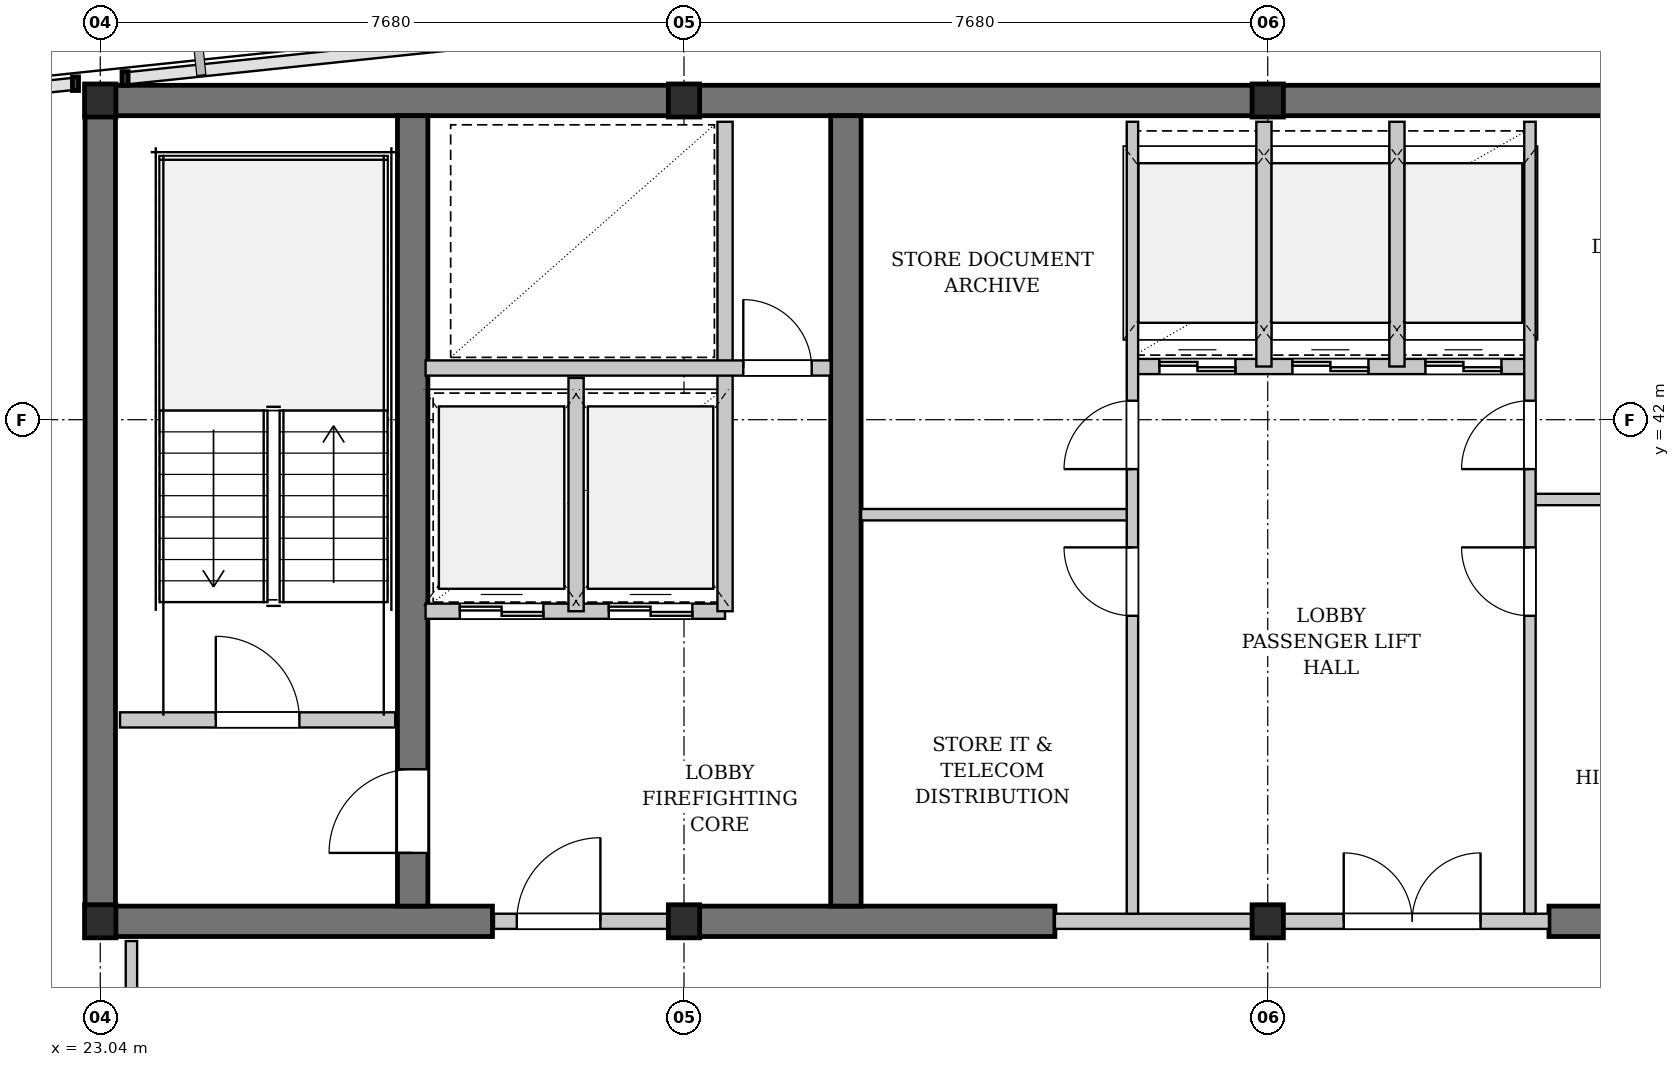
"""IFC4 building model, lengths in metres.
Left out: names, types, materials, properties, quantities, classifications, styles, units other than length and angle.
Written with IfcOpenShell. Run it as: python <this file> out.ifc"""

import sys

from ifc_helpers import new_model, si_unit, direction, frame, frame_2d, origin, origin_2d, place, context, subcontext, project, spatial, rectangle, i_section, extrude, element, fill, save


model = new_model("IFC4")
c1 = context("Model", 3, precision=1e-05, world=origin(), true_north=direction((0.0, 1.0)))
c2 = subcontext(c1, "Body", "Model", "MODEL_VIEW")
j1 = project(units=[si_unit("LENGTHUNIT", "METRE"), si_unit("PLANEANGLEUNIT", "RADIAN")], contexts=[c1])
p1 = place(None, origin())
s1 = spatial("IfcSite", under=j1, at=p1, CompositionType="ELEMENT")
p2 = place(p1, origin())
s2 = spatial("IfcBuilding", under=s1, at=p2, CompositionType="ELEMENT")
p3 = place(p2, frame((0.0, 0.0, 227.6)))
s3 = spatial("IfcBuildingStorey", under=s2, at=p3, CompositionType="ELEMENT", Elevation=227.6)
p4 = place(p3, frame((22.84, 46.2, 0.0), z_axis=(0.0, 0.0, 1.0), x_axis=(1.0, 0.0, 0.0)))
e1 = element("IfcWall", 1, at=p4, inside=s3, PredefinedType="SHEAR", context=c2, shape_type="SweptSolid", body=[
    extrude(rectangle(XDim=31.12, YDim=0.4, at=frame_2d((15.56, 0.0))), origin(), (0.0, 0.0, 1.0), 3.08),
])
p5 = place(p3, frame((22.84, 35.4, 0.0), z_axis=(0.0, 0.0, 1.0), x_axis=(1.0, 0.0, 0.0)))
e2 = element("IfcWall", 2, at=p5, inside=s3, PredefinedType="SHEAR", context=c2, shape_type="SweptSolid", body=[
    extrude(rectangle(XDim=5.36, YDim=0.4, at=frame_2d((2.68, 0.0))), origin(), (0.0, 0.0, 1.0), 3.08),
])
p6 = place(p3, frame((30.72, 35.4, 0.0), z_axis=(0.0, 0.0, 1.0), x_axis=(1.0, 0.0, 0.0)))
e3 = element("IfcWall", 3, at=p6, inside=s3, PredefinedType="SHEAR", context=c2, shape_type="SweptSolid", body=[
    extrude(rectangle(XDim=4.88, YDim=0.4, at=frame_2d((2.44, 0.0))), origin(), (0.0, 0.0, 1.0), 3.08),
])
p7 = place(p3, frame((42.1, 35.4, 0.0), z_axis=(0.0, 0.0, 1.0), x_axis=(1.0, 0.0, 0.0)))
e4 = element("IfcWall", 4, at=p7, inside=s3, PredefinedType="SHEAR", context=c2, shape_type="SweptSolid", body=[
    extrude(rectangle(XDim=8.05, YDim=0.4, at=frame_2d((4.025, 0.0))), origin(), (0.0, 0.0, 1.0), 3.08),
])
p8 = place(p7, frame((4.85, 0.0, 0.0)))
e5 = element("IfcOpeningElement", 5, at=p8, cuts=e4, PredefinedType="OPENING", context=c2, shape_type="SweptSolid", body=[
    extrude(rectangle(XDim=0.9, YDim=2.15, at=frame_2d((0.45, 1.075))), frame((0.0, 0.21, 0.0), z_axis=(0.0, -1.0, 0.0), x_axis=(1.0, 0.0, 0.0)), (0.0, 0.0, 1.0), 0.42),
])
p9 = place(p3, frame((23.04, 35.6, 0.0), z_axis=(0.0, 0.0, 1.0), x_axis=(0.0, 1.0, 0.0)))
e6 = element("IfcWall", 6, at=p9, inside=s3, PredefinedType="SHEAR", context=c2, shape_type="SweptSolid", body=[
    extrude(rectangle(XDim=10.4, YDim=0.4, at=frame_2d((5.2, 0.0))), origin(), (0.0, 0.0, 1.0), 3.08),
])
p10 = place(p3, frame((27.15, 35.6, 0.0), z_axis=(0.0, 0.0, 1.0), x_axis=(0.0, 1.0, 0.0)))
e7 = element("IfcWall", 7, at=p10, inside=s3, PredefinedType="SHEAR", context=c2, shape_type="SweptSolid", body=[
    extrude(rectangle(XDim=10.4, YDim=0.4, at=frame_2d((5.2, 0.0))), origin(), (0.0, 0.0, 1.0), 3.08),
])
p11 = place(p10, frame((0.7, 0.0, 0.0)))
e8 = element("IfcOpeningElement", 8, at=p11, cuts=e7, PredefinedType="OPENING", context=c2, shape_type="SweptSolid", body=[
    extrude(rectangle(XDim=1.1, YDim=2.15, at=frame_2d((0.55, 1.075))), frame((0.0, 0.21, 0.0), z_axis=(0.0, -1.0, 0.0), x_axis=(1.0, 0.0, 0.0)), (0.0, 0.0, 1.0), 0.42),
])
p12 = place(p3, frame((32.85, 35.6, 0.0), z_axis=(0.0, 0.0, 1.0), x_axis=(0.0, 1.0, 0.0)))
e9 = element("IfcWall", 9, at=p12, inside=s3, PredefinedType="SHEAR", context=c2, shape_type="SweptSolid", body=[
    extrude(rectangle(XDim=10.4, YDim=0.4, at=frame_2d((5.2, 0.0))), origin(), (0.0, 0.0, 1.0), 3.08),
])
for number, where, z_axis, x_axis in (
    (10, (23.04, 35.4, 0.0), (0.0, 0.0, 1.0), (1.0, 0.0, 0.0)),
    (11, (23.04, 46.2, 0.0), (0.0, 0.0, 1.0), (1.0, 0.0, 0.0)),
    (12, (30.72, 35.4, 0.0), (0.0, 0.0, 1.0), (1.0, 0.0, 0.0)),
    (13, (30.72, 46.2, 0.0), (0.0, 0.0, 1.0), (1.0, 0.0, 0.0)),
    (14, (38.4, 35.4, 0.0), (0.0, 0.0, 1.0), (1.0, 0.0, 0.0)),
    (15, (38.4, 46.2, 0.0), (0.0, 0.0, 1.0), (1.0, 0.0, 0.0)),
):
    element("IfcColumn", number, at=place(p3, frame(where, z_axis=z_axis, x_axis=x_axis)), inside=s3, PredefinedType="COLUMN", context=c2, shape_type="SweptSolid", body=[
        extrude(i_section(OverallWidth=0.412, OverallDepth=0.435, WebThickness=0.036, FlangeThickness=0.058, FilletRadius=0.015, at=origin_2d()), origin(), (0.0, 0.0, 1.0), 3.3),
    ])
p13 = place(p3, frame((23.3, 38.05, 0.0), z_axis=(0.0, 0.0, 1.0), x_axis=(1.0, 0.0, 0.0)))
e16 = element("IfcWall", 16, at=p13, inside=s3, PredefinedType="PARTITIONING", context=c2, shape_type="SweptSolid", body=[
    extrude(rectangle(XDim=3.62, YDim=0.2, at=frame_2d((1.81, 0.0))), origin(), (0.0, 0.0, 1.0), 3.08),
])
p14 = place(p13, frame((1.26, 0.0, 0.0)))
e17 = element("IfcOpeningElement", 17, at=p14, cuts=e16, PredefinedType="OPENING", context=c2, shape_type="SweptSolid", body=[
    extrude(rectangle(XDim=1.1, YDim=2.15, at=frame_2d((0.55, 1.075))), frame((0.0, 0.11, 0.0), z_axis=(0.0, -1.0, 0.0), x_axis=(1.0, 0.0, 0.0)), (0.0, 0.0, 1.0), 0.22),
])
p15 = place(p3, frame((28.22, 35.4, 0.0), z_axis=(0.0, 0.0, 1.0), x_axis=(1.0, 0.0, 0.0)))
e18 = element("IfcWall", 18, at=p15, inside=s3, PredefinedType="PARTITIONING", context=c2, shape_type="SweptSolid", body=[
    extrude(rectangle(XDim=2.5, YDim=0.2, at=frame_2d((1.25, 0.0))), origin(), (0.0, 0.0, 1.0), 2.313),
])
p16 = place(p15, frame((0.3, 0.0, 0.0)))
e19 = element("IfcOpeningElement", 19, at=p16, cuts=e18, PredefinedType="OPENING", context=c2, shape_type="SweptSolid", body=[
    extrude(rectangle(XDim=1.1, YDim=2.15, at=frame_2d((0.55, 1.075))), frame((0.0, 0.11, 0.0), z_axis=(0.0, -1.0, 0.0), x_axis=(1.0, 0.0, 0.0)), (0.0, 0.0, 1.0), 0.22),
])
p17 = place(p3, frame((27.32, 39.48, 0.0), z_axis=(0.0, 0.0, 1.0), x_axis=(1.0, 0.0, 0.0)))
e20 = element("IfcWall", 20, at=p17, inside=s3, PredefinedType="PARTITIONING", context=c2, shape_type="SweptSolid", body=[
    extrude(rectangle(XDim=3.94, YDim=0.2, at=frame_2d((1.97, 0.0))), origin(), (0.0, 0.0, 1.0), 3.08),
])
p18 = place(p17, frame((0.45, 0.0, 0.0)))
e21 = element("IfcOpeningElement", 21, at=p18, cuts=e20, PredefinedType="OPENING", context=c2, shape_type="SweptSolid", body=[
    extrude(rectangle(XDim=1.1, YDim=2.2, at=frame_2d((0.55, 1.1))), frame((0.0, 0.11, 0.0), z_axis=(0.0, -1.0, 0.0), x_axis=(1.0, 0.0, 0.0)), (0.0, 0.0, 1.0), 0.22),
])
p19 = place(p17, frame((2.41, 0.0, 0.0)))
e22 = element("IfcOpeningElement", 22, at=p19, cuts=e20, PredefinedType="OPENING", context=c2, shape_type="SweptSolid", body=[
    extrude(rectangle(XDim=1.1, YDim=2.2, at=frame_2d((0.55, 1.1))), frame((0.0, 0.11, 0.0), z_axis=(0.0, -1.0, 0.0), x_axis=(1.0, 0.0, 0.0)), (0.0, 0.0, 1.0), 0.22),
])
p20 = place(p3, frame((29.3, 39.48, 0.0), z_axis=(0.0, 0.0, 1.0), x_axis=(0.0, 1.0, 0.0)))
e23 = element("IfcWall", 23, at=p20, inside=s3, PredefinedType="PARTITIONING", context=c2, shape_type="SweptSolid", body=[
    extrude(rectangle(XDim=3.07, YDim=0.2, at=frame_2d((1.535, 0.0))), origin(), (0.0, 0.0, 1.0), 3.08),
])
p21 = place(p3, frame((31.26, 39.48, 0.0), z_axis=(0.0, 0.0, 1.0), x_axis=(0.0, 1.0, 0.0)))
e24 = element("IfcWall", 24, at=p21, inside=s3, PredefinedType="PARTITIONING", context=c2, shape_type="SweptSolid", body=[
    extrude(rectangle(XDim=6.44, YDim=0.2, at=frame_2d((3.22, 0.0))), origin(), (0.0, 0.0, 1.0), 3.08),
])
p22 = place(p3, frame((27.32, 42.68, 0.0), z_axis=(0.0, 0.0, 1.0), x_axis=(1.0, 0.0, 0.0)))
e25 = element("IfcWall", 25, at=p22, inside=s3, PredefinedType="PARTITIONING", context=c2, shape_type="SweptSolid", body=[
    extrude(rectangle(XDim=5.33, YDim=0.2, at=frame_2d((2.665, 0.0))), origin(), (0.0, 0.0, 1.0), 3.08),
])
p23 = place(p22, frame((4.18, 0.0, 0.0)))
e26 = element("IfcOpeningElement", 26, at=p23, cuts=e25, PredefinedType="OPENING", context=c2, shape_type="SweptSolid", body=[
    extrude(rectangle(XDim=0.9, YDim=2.15, at=frame_2d((0.45, 1.075))), frame((0.0, 0.11, 0.0), z_axis=(0.0, -1.0, 0.0), x_axis=(1.0, 0.0, 0.0)), (0.0, 0.0, 1.0), 0.22),
])
p24 = place(p3, frame((35.6, 35.4, 0.0), z_axis=(0.0, 0.0, 1.0), x_axis=(1.0, 0.0, 0.0)))
e27 = element("IfcWall", 27, at=p24, inside=s3, PredefinedType="PARTITIONING", context=c2, shape_type="SweptSolid", body=[
    extrude(rectangle(XDim=6.5, YDim=0.2, at=frame_2d((3.25, 0.0))), origin(), (0.0, 0.0, 1.0), 2.313),
])
p25 = place(p24, frame((3.8, 0.0, 0.0)))
e28 = element("IfcOpeningElement", 28, at=p25, cuts=e27, PredefinedType="OPENING", context=c2, shape_type="SweptSolid", body=[
    extrude(rectangle(XDim=1.8, YDim=2.3, at=frame_2d((0.9, 1.15))), frame((0.0, 0.11, 0.0), z_axis=(0.0, -1.0, 0.0), x_axis=(1.0, 0.0, 0.0)), (0.0, 0.0, 1.0), 0.22),
])
p26 = place(p3, frame((36.6, 42.7, 0.0), z_axis=(0.0, 0.0, 1.0), x_axis=(1.0, 0.0, 0.0)))
e29 = element("IfcWall", 29, at=p26, inside=s3, PredefinedType="PARTITIONING", context=c2, shape_type="SweptSolid", body=[
    extrude(rectangle(XDim=5.25, YDim=0.2, at=frame_2d((2.625, 0.0))), origin(), (0.0, 0.0, 1.0), 3.08),
])
p27 = place(p26, frame((0.375, 0.0, 0.0)))
e30 = element("IfcOpeningElement", 30, at=p27, cuts=e29, PredefinedType="OPENING", context=c2, shape_type="SweptSolid", body=[
    extrude(rectangle(XDim=1.0, YDim=2.2, at=frame_2d((0.5, 1.1))), frame((0.0, 0.11, 0.0), z_axis=(0.0, -1.0, 0.0), x_axis=(1.0, 0.0, 0.0)), (0.0, 0.0, 1.0), 0.22),
])
p28 = place(p26, frame((2.125, 0.0, 0.0)))
e31 = element("IfcOpeningElement", 31, at=p28, cuts=e29, PredefinedType="OPENING", context=c2, shape_type="SweptSolid", body=[
    extrude(rectangle(XDim=1.0, YDim=2.2, at=frame_2d((0.5, 1.1))), frame((0.0, 0.11, 0.0), z_axis=(0.0, -1.0, 0.0), x_axis=(1.0, 0.0, 0.0)), (0.0, 0.0, 1.0), 0.22),
])
p29 = place(p26, frame((3.875, 0.0, 0.0)))
e32 = element("IfcOpeningElement", 32, at=p29, cuts=e29, PredefinedType="OPENING", context=c2, shape_type="SweptSolid", body=[
    extrude(rectangle(XDim=1.0, YDim=2.2, at=frame_2d((0.5, 1.1))), frame((0.0, 0.11, 0.0), z_axis=(0.0, -1.0, 0.0), x_axis=(1.0, 0.0, 0.0)), (0.0, 0.0, 1.0), 0.22),
])
p30 = place(p3, frame((38.35, 42.7, 0.0), z_axis=(0.0, 0.0, 1.0), x_axis=(0.0, 1.0, 0.0)))
e33 = element("IfcWall", 33, at=p30, inside=s3, PredefinedType="PARTITIONING", context=c2, shape_type="SweptSolid", body=[
    extrude(rectangle(XDim=3.22, YDim=0.2, at=frame_2d((1.61, 0.0))), origin(), (0.0, 0.0, 1.0), 2.313),
])
p31 = place(p3, frame((40.1, 42.7, 0.0), z_axis=(0.0, 0.0, 1.0), x_axis=(0.0, 1.0, 0.0)))
e34 = element("IfcWall", 34, at=p31, inside=s3, PredefinedType="PARTITIONING", context=c2, shape_type="SweptSolid", body=[
    extrude(rectangle(XDim=3.22, YDim=0.2, at=frame_2d((1.61, 0.0))), origin(), (0.0, 0.0, 1.0), 3.08),
])
p32 = place(p3, frame((33.05, 40.75, 0.0), z_axis=(0.0, 0.0, 1.0), x_axis=(1.0, 0.0, 0.0)))
e35 = element("IfcWall", 35, at=p32, inside=s3, PredefinedType="PARTITIONING", context=c2, shape_type="SweptSolid", body=[
    extrude(rectangle(XDim=3.57, YDim=0.15, at=frame_2d((1.785, 0.0))), origin(), (0.0, 0.0, 1.0), 3.08),
])
p33 = place(p3, frame((36.62, 35.5, 0.0), z_axis=(0.0, 0.0, 1.0), x_axis=(0.0, 1.0, 0.0)))
e36 = element("IfcWall", 36, at=p33, inside=s3, PredefinedType="PARTITIONING", context=c2, shape_type="SweptSolid", body=[
    extrude(rectangle(XDim=10.42, YDim=0.15, at=frame_2d((5.21, 0.0))), origin(), (0.0, 0.0, 1.0), 3.08),
])
p34 = place(p33, frame((3.92, 0.0, 0.0)))
e37 = element("IfcOpeningElement", 37, at=p34, cuts=e36, PredefinedType="OPENING", context=c2, shape_type="SweptSolid", body=[
    extrude(rectangle(XDim=0.9, YDim=2.15, at=frame_2d((0.45, 1.075))), frame((0.0, 0.085, 0.0), z_axis=(0.0, -1.0, 0.0), x_axis=(1.0, 0.0, 0.0)), (0.0, 0.0, 1.0), 0.17),
])
p35 = place(p33, frame((5.85, 0.0, 0.0)))
e38 = element("IfcOpeningElement", 38, at=p35, cuts=e36, PredefinedType="OPENING", context=c2, shape_type="SweptSolid", body=[
    extrude(rectangle(XDim=0.9, YDim=2.15, at=frame_2d((0.45, 1.075))), frame((0.0, 0.085, 0.0), z_axis=(0.0, -1.0, 0.0), x_axis=(1.0, 0.0, 0.0)), (0.0, 0.0, 1.0), 0.17),
])
p36 = place(p3, frame((41.85, 40.95, 0.0), z_axis=(0.0, 0.0, 1.0), x_axis=(1.0, 0.0, 0.0)))
e39 = element("IfcWall", 39, at=p36, inside=s3, PredefinedType="PARTITIONING", context=c2, shape_type="SweptSolid", body=[
    extrude(rectangle(XDim=3.37, YDim=0.15, at=frame_2d((1.685, 0.0))), origin(), (0.0, 0.0, 1.0), 3.08),
])
p37 = place(p3, frame((41.85, 35.5, 0.0), z_axis=(0.0, 0.0, 1.0), x_axis=(0.0, 1.0, 0.0)))
e40 = element("IfcWall", 40, at=p37, inside=s3, PredefinedType="PARTITIONING", context=c2, shape_type="SweptSolid", body=[
    extrude(rectangle(XDim=10.42, YDim=0.15, at=frame_2d((5.21, 0.0))), origin(), (0.0, 0.0, 1.0), 3.08),
])
p38 = place(p37, frame((3.92, 0.0, 0.0)))
e41 = element("IfcOpeningElement", 41, at=p38, cuts=e40, PredefinedType="OPENING", context=c2, shape_type="SweptSolid", body=[
    extrude(rectangle(XDim=0.9, YDim=2.15, at=frame_2d((0.45, 1.075))), frame((0.0, 0.085, 0.0), z_axis=(0.0, -1.0, 0.0), x_axis=(1.0, 0.0, 0.0)), (0.0, 0.0, 1.0), 0.17),
])
p39 = place(p37, frame((5.85, 0.0, 0.0)))
e42 = element("IfcOpeningElement", 42, at=p39, cuts=e40, PredefinedType="OPENING", context=c2, shape_type="SweptSolid", body=[
    extrude(rectangle(XDim=0.9, YDim=2.15, at=frame_2d((0.45, 1.075))), frame((0.0, 0.085, 0.0), z_axis=(0.0, -1.0, 0.0), x_axis=(1.0, 0.0, 0.0)), (0.0, 0.0, 1.0), 0.17),
])
p40 = place(p3, frame((23.45, 21.35, 0.0), z_axis=(0.0, 0.0, 1.0), x_axis=(0.0, 1.0, 0.0)))
e43 = element("IfcWall", 43, at=p40, inside=s3, PredefinedType="PARTITIONING", context=c2, shape_type="SweptSolid", body=[
    extrude(rectangle(XDim=13.79, YDim=0.15, at=frame_2d((6.895, 0.0))), origin(), (0.0, 0.0, 1.0), 3.08),
])
p41 = place(p40, frame((1.03, 0.0, 0.0)))
e44 = element("IfcOpeningElement", 44, at=p41, cuts=e43, PredefinedType="OPENING", context=c2, shape_type="SweptSolid", body=[
    extrude(rectangle(XDim=0.9, YDim=2.15, at=frame_2d((0.45, 1.075))), frame((0.0, 0.085, 0.0), z_axis=(0.0, -1.0, 0.0), x_axis=(1.0, 0.0, 0.0)), (0.0, 0.0, 1.0), 0.17),
])
p42 = place(p14, origin())
e45 = element("IfcDoor", 45, at=p42, inside=s3, OperationType="SINGLE_SWING_LEFT", PredefinedType="DOOR", context=c2, shape_type="SweptSolid", body=[
    extrude(rectangle(XDim=1.1, YDim=2.15, at=frame_2d((0.55, 1.075))), frame((0.0, 0.025, 0.0), z_axis=(0.0, -1.0, 0.0), x_axis=(1.0, 0.0, 0.0)), (0.0, 0.0, 1.0), 0.05),
])
fill(e17, e45)
p43 = place(p16, origin())
e46 = element("IfcDoor", 46, at=p43, inside=s3, OperationType="SINGLE_SWING_RIGHT", PredefinedType="DOOR", context=c2, shape_type="SweptSolid", body=[
    extrude(rectangle(XDim=1.1, YDim=2.15, at=frame_2d((0.55, 1.075))), frame((0.0, 0.025, 0.0), z_axis=(0.0, -1.0, 0.0), x_axis=(1.0, 0.0, 0.0)), (0.0, 0.0, 1.0), 0.05),
])
fill(e19, e46)
p44 = place(p18, origin())
e47 = element("IfcDoor", 47, at=p44, inside=s3, OperationType="DOUBLE_DOOR_SLIDING", PredefinedType="DOOR", context=c2, shape_type="SweptSolid", body=[
    extrude(rectangle(XDim=1.1, YDim=2.2, at=frame_2d((0.55, 1.1))), frame((0.0, 0.025, 0.0), z_axis=(0.0, -1.0, 0.0), x_axis=(1.0, 0.0, 0.0)), (0.0, 0.0, 1.0), 0.05),
])
fill(e21, e47)
p45 = place(p19, origin())
e48 = element("IfcDoor", 48, at=p45, inside=s3, OperationType="DOUBLE_DOOR_SLIDING", PredefinedType="DOOR", context=c2, shape_type="SweptSolid", body=[
    extrude(rectangle(XDim=1.1, YDim=2.2, at=frame_2d((0.55, 1.1))), frame((0.0, 0.025, 0.0), z_axis=(0.0, -1.0, 0.0), x_axis=(1.0, 0.0, 0.0)), (0.0, 0.0, 1.0), 0.05),
])
fill(e22, e48)
p46 = place(p23, origin())
e49 = element("IfcDoor", 49, at=p46, inside=s3, OperationType="SINGLE_SWING_LEFT", PredefinedType="DOOR", context=c2, shape_type="SweptSolid", body=[
    extrude(rectangle(XDim=0.9, YDim=2.15, at=frame_2d((0.45, 1.075))), frame((0.0, 0.025, 0.0), z_axis=(0.0, -1.0, 0.0), x_axis=(1.0, 0.0, 0.0)), (0.0, 0.0, 1.0), 0.05),
])
fill(e26, e49)
p47 = place(p25, origin())
e50 = element("IfcDoor", 50, at=p47, inside=s3, OperationType="DOUBLE_DOOR_SINGLE_SWING", PredefinedType="DOOR", context=c2, shape_type="SweptSolid", body=[
    extrude(rectangle(XDim=1.8, YDim=2.3, at=frame_2d((0.9, 1.15))), frame((0.0, 0.025, 0.0), z_axis=(0.0, -1.0, 0.0), x_axis=(1.0, 0.0, 0.0)), (0.0, 0.0, 1.0), 0.05),
])
fill(e28, e50)
p48 = place(p27, origin())
e51 = element("IfcDoor", 51, at=p48, inside=s3, OperationType="DOUBLE_DOOR_SLIDING", PredefinedType="DOOR", context=c2, shape_type="SweptSolid", body=[
    extrude(rectangle(XDim=1.0, YDim=2.2, at=frame_2d((0.5, 1.1))), frame((0.0, 0.025, 0.0), z_axis=(0.0, -1.0, 0.0), x_axis=(1.0, 0.0, 0.0)), (0.0, 0.0, 1.0), 0.05),
])
fill(e30, e51)
p49 = place(p28, origin())
e52 = element("IfcDoor", 52, at=p49, inside=s3, OperationType="DOUBLE_DOOR_SLIDING", PredefinedType="DOOR", context=c2, shape_type="SweptSolid", body=[
    extrude(rectangle(XDim=1.0, YDim=2.2, at=frame_2d((0.5, 1.1))), frame((0.0, 0.025, 0.0), z_axis=(0.0, -1.0, 0.0), x_axis=(1.0, 0.0, 0.0)), (0.0, 0.0, 1.0), 0.05),
])
fill(e31, e52)
p50 = place(p29, origin())
e53 = element("IfcDoor", 53, at=p50, inside=s3, OperationType="DOUBLE_DOOR_SLIDING", PredefinedType="DOOR", context=c2, shape_type="SweptSolid", body=[
    extrude(rectangle(XDim=1.0, YDim=2.2, at=frame_2d((0.5, 1.1))), frame((0.0, 0.025, 0.0), z_axis=(0.0, -1.0, 0.0), x_axis=(1.0, 0.0, 0.0)), (0.0, 0.0, 1.0), 0.05),
])
fill(e32, e53)
p51 = place(p34, origin())
e54 = element("IfcDoor", 54, at=p51, inside=s3, OperationType="SINGLE_SWING_RIGHT", PredefinedType="DOOR", context=c2, shape_type="SweptSolid", body=[
    extrude(rectangle(XDim=0.9, YDim=2.15, at=frame_2d((0.45, 1.075))), frame((0.0, 0.025, 0.0), z_axis=(0.0, -1.0, 0.0), x_axis=(1.0, 0.0, 0.0)), (0.0, 0.0, 1.0), 0.05),
])
fill(e37, e54)
p52 = place(p35, origin())
e55 = element("IfcDoor", 55, at=p52, inside=s3, OperationType="SINGLE_SWING_LEFT", PredefinedType="DOOR", context=c2, shape_type="SweptSolid", body=[
    extrude(rectangle(XDim=0.9, YDim=2.15, at=frame_2d((0.45, 1.075))), frame((0.0, 0.025, 0.0), z_axis=(0.0, -1.0, 0.0), x_axis=(1.0, 0.0, 0.0)), (0.0, 0.0, 1.0), 0.05),
])
fill(e38, e55)
p53 = place(p38, origin())
e56 = element("IfcDoor", 56, at=p53, inside=s3, OperationType="SINGLE_SWING_RIGHT", PredefinedType="DOOR", context=c2, shape_type="SweptSolid", body=[
    extrude(rectangle(XDim=0.9, YDim=2.15, at=frame_2d((0.45, 1.075))), frame((0.0, 0.025, 0.0), z_axis=(0.0, -1.0, 0.0), x_axis=(1.0, 0.0, 0.0)), (0.0, 0.0, 1.0), 0.05),
])
fill(e41, e56)
p54 = place(p39, origin())
e57 = element("IfcDoor", 57, at=p54, inside=s3, OperationType="SINGLE_SWING_LEFT", PredefinedType="DOOR", context=c2, shape_type="SweptSolid", body=[
    extrude(rectangle(XDim=0.9, YDim=2.15, at=frame_2d((0.45, 1.075))), frame((0.0, 0.025, 0.0), z_axis=(0.0, -1.0, 0.0), x_axis=(1.0, 0.0, 0.0)), (0.0, 0.0, 1.0), 0.05),
])
fill(e42, e57)
p55 = place(p11, origin())
e58 = element("IfcDoor", 58, at=p55, inside=s3, OperationType="SINGLE_SWING_LEFT", PredefinedType="DOOR", context=c2, shape_type="SweptSolid", body=[
    extrude(rectangle(XDim=1.1, YDim=2.15, at=frame_2d((0.55, 1.075))), frame((0.0, 0.025, 0.0), z_axis=(0.0, -1.0, 0.0), x_axis=(1.0, 0.0, 0.0)), (0.0, 0.0, 1.0), 0.05),
])
fill(e8, e58)
save(model, sys.argv[1])
